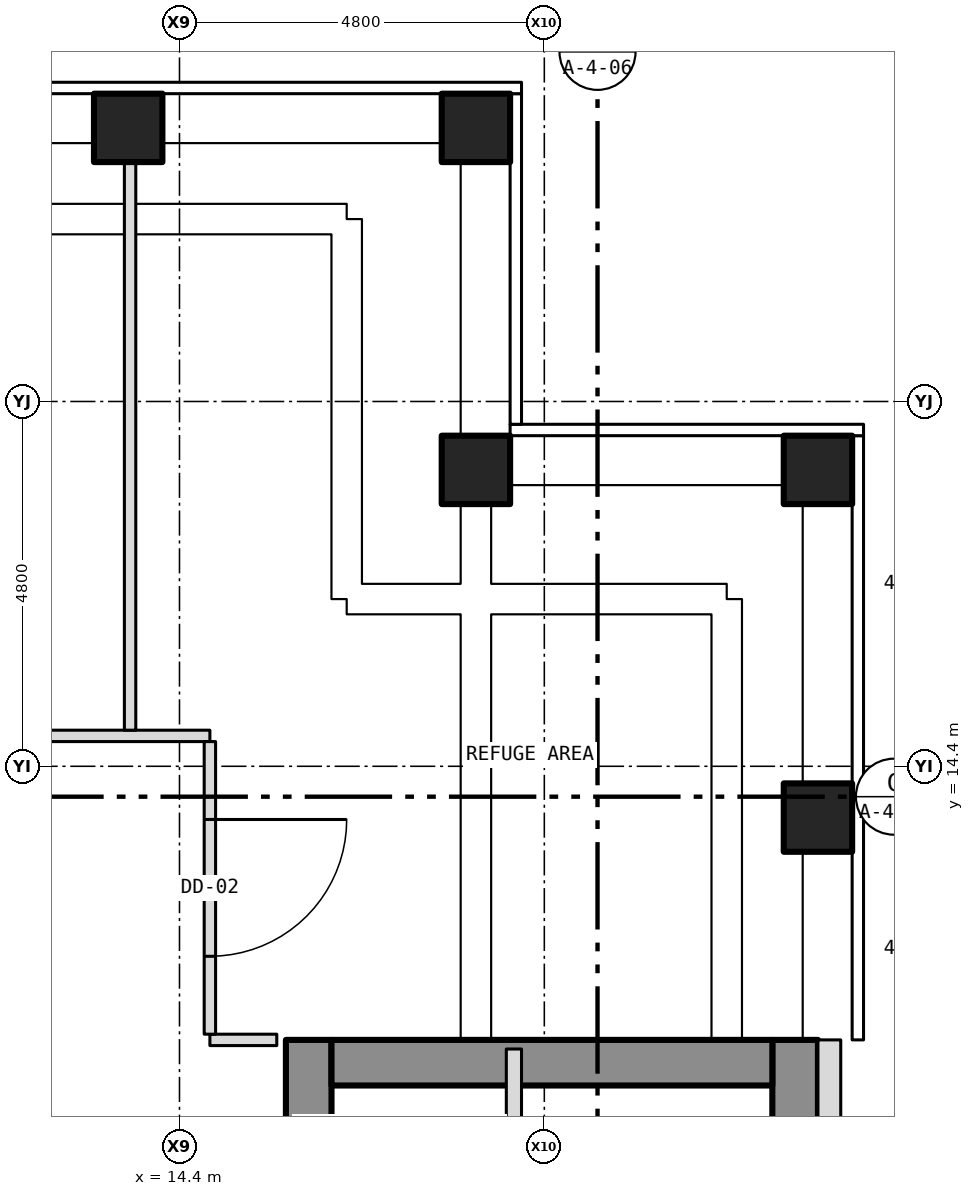
"""IFC4 building model, lengths in metres.
Left out: names, types, materials, properties, quantities, classifications, styles, units other than length and angle.
Written with IfcOpenShell. Run it as: python <this file> out.ifc"""

import sys

from ifc_helpers import new_model, si_unit, direction, frame, frame_2d, origin, origin_2d, place, context, subcontext, project, spatial, rectangle, hollow_rectangle, extrude, element, fill, save


model = new_model("IFC4")
c1 = context("Model", 3, precision=1e-05, world=origin(), true_north=direction((0.0, 1.0)))
c2 = subcontext(c1, "Body", "Model", "MODEL_VIEW")
j1 = project(units=[si_unit("LENGTHUNIT", "METRE"), si_unit("PLANEANGLEUNIT", "RADIAN")], contexts=[c1])
p1 = place(None, origin())
s1 = spatial("IfcSite", under=j1, at=p1, CompositionType="ELEMENT")
p2 = place(p1, origin())
s2 = spatial("IfcBuilding", under=s1, at=p2, CompositionType="ELEMENT")
p3 = place(p2, frame((0.0, 0.0, 138.0)))
s3 = spatial("IfcBuildingStorey", under=s2, at=p3, CompositionType="ELEMENT", Elevation=138.0)
for number, where, z_axis, x_axis in (
    (1, (13.725, 22.8, -0.3), (0.0, 0.0, 1.0), (1.0, 0.0, 0.0)),
    (2, (18.3, 22.8, -0.3), (0.0, 0.0, 1.0), (1.0, 0.0, 0.0)),
    (3, (22.8, 13.725, -0.3), (0.0, 0.0, 1.0), (1.0, 0.0, 0.0)),
    (4, (22.8, 18.3, -0.3), (0.0, 0.0, 1.0), (1.0, 0.0, 0.0)),
    (5, (18.3, 18.3, -0.3), (0.0, 0.0, 1.0), (1.0, 0.0, 0.0)),
):
    element("IfcColumn", number, at=place(p3, frame(where, z_axis=z_axis, x_axis=x_axis)), inside=s3, PredefinedType="COLUMN", context=c2, shape_type="SweptSolid", body=[
        extrude(hollow_rectangle(XDim=0.9, YDim=0.9, WallThickness=0.05, at=origin_2d()), origin(), (0.0, 0.0, 1.0), 4.6),
    ])
p4 = place(p3, frame((16.1, -10.8, 0.0), z_axis=(0.0, 0.0, 1.0), x_axis=(0.0, 1.0, 0.0)))
e6 = element("IfcWall", 6, at=p4, inside=s3, PredefinedType="SHEAR", context=c2, shape_type="SweptSolid", body=[
    extrude(rectangle(XDim=21.6, YDim=0.6, at=frame_2d((10.8, 0.0))), origin(), (0.0, 0.0, 1.0), 3.9),
])
p5 = place(p4, frame((9.4, 0.0, 0.0)))
e7 = element("IfcOpeningElement", 7, at=p5, cuts=e6, PredefinedType="OPENING", context=c2, shape_type="SweptSolid", body=[
    extrude(rectangle(XDim=1.1, YDim=2.1, at=frame_2d((0.55, 1.05))), frame((0.0, 0.312, 0.0), z_axis=(0.0, -1.0, 0.0), x_axis=(1.0, 0.0, 0.0)), (0.0, 0.0, 1.0), 0.624),
])
p6 = place(p4, frame((11.5, 0.0, 0.0)))
e8 = element("IfcOpeningElement", 8, at=p6, cuts=e6, PredefinedType="OPENING", context=c2, shape_type="SweptSolid", body=[
    extrude(rectangle(XDim=1.1, YDim=2.1, at=frame_2d((0.55, 1.05))), frame((0.0, 0.312, 0.0), z_axis=(0.0, -1.0, 0.0), x_axis=(1.0, 0.0, 0.0)), (0.0, 0.0, 1.0), 0.624),
])
p7 = place(p4, frame((5.642, 0.0, 0.0)))
e9 = element("IfcOpeningElement", 9, at=p7, cuts=e6, PredefinedType="OPENING", context=c2, shape_type="SweptSolid", body=[
    extrude(rectangle(XDim=1.1, YDim=2.1, at=frame_2d((0.55, 1.05))), frame((0.0, 0.312, 0.0), z_axis=(0.0, -1.0, 0.0), x_axis=(1.0, 0.0, 0.0)), (0.0, 0.0, 1.0), 0.624),
])
p8 = place(p4, frame((7.5, 0.0, 0.0)))
e10 = element("IfcOpeningElement", 10, at=p8, cuts=e6, PredefinedType="OPENING", context=c2, shape_type="SweptSolid", body=[
    extrude(rectangle(XDim=1.1, YDim=2.1, at=frame_2d((0.55, 1.05))), frame((0.0, 0.312, 0.0), z_axis=(0.0, -1.0, 0.0), x_axis=(1.0, 0.0, 0.0)), (0.0, 0.0, 1.0), 0.624),
])
p9 = place(p3, frame((22.5, -10.8, 0.0), z_axis=(0.0, 0.0, 1.0), x_axis=(0.0, 1.0, 0.0)))
e11 = element("IfcWall", 11, at=p9, inside=s3, PredefinedType="SHEAR", context=c2, shape_type="SweptSolid", body=[
    extrude(rectangle(XDim=21.6, YDim=0.6, at=frame_2d((10.8, 0.0))), origin(), (0.0, 0.0, 1.0), 3.9),
])
p10 = place(p3, frame((16.4, 10.5, 0.0), z_axis=(0.0, 0.0, 1.0), x_axis=(1.0, 0.0, 0.0)))
e12 = element("IfcWall", 12, at=p10, inside=s3, PredefinedType="SHEAR", context=c2, shape_type="SweptSolid", body=[
    extrude(rectangle(XDim=5.8, YDim=0.6, at=frame_2d((2.9, 0.0))), origin(), (0.0, 0.0, 1.0), 3.9),
])
p11 = place(p3, frame((22.95, -10.8, 0.0), z_axis=(0.0, 0.0, 1.0), x_axis=(0.0, 1.0, 0.0)))
e13 = element("IfcWall", 13, at=p11, inside=s3, PredefinedType="SOLIDWALL", context=c2, shape_type="SweptSolid", body=[
    extrude(rectangle(XDim=21.6, YDim=0.3, at=frame_2d((10.8, 0.0))), origin(), (0.0, 0.0, 1.0), 4.5),
])
p12 = place(p11, frame((3.0, 0.0, 2.2)))
e14 = element("IfcOpeningElement", 14, at=p12, cuts=e13, PredefinedType="OPENING", context=c2, shape_type="SweptSolid", body=[
    extrude(rectangle(XDim=1.2, YDim=0.6, at=frame_2d((0.6, 0.3))), frame((0.0, 0.162, 0.0), z_axis=(0.0, -1.0, 0.0), x_axis=(1.0, 0.0, 0.0)), (0.0, 0.0, 1.0), 0.324),
])
p13 = place(p11, frame((7.8, 0.0, 2.2)))
e15 = element("IfcOpeningElement", 15, at=p13, cuts=e13, PredefinedType="OPENING", context=c2, shape_type="SweptSolid", body=[
    extrude(rectangle(XDim=1.2, YDim=0.6, at=frame_2d((0.6, 0.3))), frame((0.0, 0.162, 0.0), z_axis=(0.0, -1.0, 0.0), x_axis=(1.0, 0.0, 0.0)), (0.0, 0.0, 1.0), 0.324),
])
p14 = place(p11, frame((12.6, 0.0, 2.2)))
e16 = element("IfcOpeningElement", 16, at=p14, cuts=e13, PredefinedType="OPENING", context=c2, shape_type="SweptSolid", body=[
    extrude(rectangle(XDim=1.2, YDim=0.6, at=frame_2d((0.6, 0.3))), frame((0.0, 0.162, 0.0), z_axis=(0.0, -1.0, 0.0), x_axis=(1.0, 0.0, 0.0)), (0.0, 0.0, 1.0), 0.324),
])
p15 = place(p11, frame((17.4, 0.0, 2.2)))
e17 = element("IfcOpeningElement", 17, at=p15, cuts=e13, PredefinedType="OPENING", context=c2, shape_type="SweptSolid", body=[
    extrude(rectangle(XDim=1.2, YDim=0.6, at=frame_2d((0.6, 0.3))), frame((0.0, 0.162, 0.0), z_axis=(0.0, -1.0, 0.0), x_axis=(1.0, 0.0, 0.0)), (0.0, 0.0, 1.0), 0.324),
])
p16 = place(p3, frame((14.8, 10.8, 0.0), z_axis=(0.0, 0.0, 1.0), x_axis=(1.0, 0.0, 0.0)))
e18 = element("IfcWall", 18, at=p16, inside=s3, PredefinedType="PARTITIONING", context=c2, shape_type="SweptSolid", body=[
    extrude(rectangle(XDim=0.88, YDim=0.15, at=frame_2d((0.44, 0.0))), origin(), (0.0, 0.0, 1.0), 4.3),
])
p17 = place(p3, frame((-14.8, 14.8, 0.0), z_axis=(0.0, 0.0, 1.0), x_axis=(1.0, 0.0, 0.0)))
e19 = element("IfcWall", 19, at=p17, inside=s3, PredefinedType="PARTITIONING", context=c2, shape_type="SweptSolid", body=[
    extrude(rectangle(XDim=29.6, YDim=0.15, at=frame_2d((14.8, 0.0))), origin(), (0.0, 0.0, 1.0), 4.3),
])
p18 = place(p17, frame((7.488, 0.0, 0.0)))
e20 = element("IfcOpeningElement", 20, at=p18, cuts=e19, PredefinedType="OPENING", context=c2, shape_type="SweptSolid", body=[
    extrude(rectangle(XDim=0.9, YDim=2.1, at=frame_2d((0.45, 1.05))), frame((0.0, 0.087, 0.0), z_axis=(0.0, -1.0, 0.0), x_axis=(1.0, 0.0, 0.0)), (0.0, 0.0, 1.0), 0.174),
])
p19 = place(p17, frame((21.213, 0.0, 0.0)))
e21 = element("IfcOpeningElement", 21, at=p19, cuts=e19, PredefinedType="OPENING", context=c2, shape_type="SweptSolid", body=[
    extrude(rectangle(XDim=0.9, YDim=2.1, at=frame_2d((0.45, 1.05))), frame((0.0, 0.087, 0.0), z_axis=(0.0, -1.0, 0.0), x_axis=(1.0, 0.0, 0.0)), (0.0, 0.0, 1.0), 0.174),
])
p20 = place(p3, frame((13.75, 14.875, 0.0), z_axis=(0.0, 0.0, 1.0), x_axis=(0.0, 1.0, 0.0)))
e22 = element("IfcWall", 22, at=p20, inside=s3, PredefinedType="PARTITIONING", context=c2, shape_type="SweptSolid", body=[
    extrude(rectangle(XDim=7.805, YDim=0.15, at=frame_2d((3.902, 0.0))), origin(), (0.0, 0.0, 1.0), 4.3),
])
p21 = place(p3, frame((14.8, 10.875, 0.0), z_axis=(0.0, 0.0, 1.0), x_axis=(0.0, 1.0, 0.0)))
e23 = element("IfcWall", 23, at=p21, inside=s3, PredefinedType="PARTITIONING", context=c2, shape_type="SweptSolid", body=[
    extrude(rectangle(XDim=3.85, YDim=0.15, at=frame_2d((1.925, 0.0))), origin(), (0.0, 0.0, 1.0), 4.3),
])
p22 = place(p21, frame((1.025, 0.0, 0.0)))
e24 = element("IfcOpeningElement", 24, at=p22, cuts=e23, PredefinedType="OPENING", context=c2, shape_type="SweptSolid", body=[
    extrude(rectangle(XDim=1.8, YDim=2.1, at=frame_2d((0.9, 1.05))), frame((0.0, 0.087, 0.0), z_axis=(0.0, -1.0, 0.0), x_axis=(1.0, 0.0, 0.0)), (0.0, 0.0, 1.0), 0.174),
])
p23 = place(p3, frame((18.8, -1.8, 0.0), z_axis=(0.0, 0.0, 1.0), x_axis=(0.0, 1.0, 0.0)))
e25 = element("IfcWall", 25, at=p23, inside=s3, PredefinedType="PARTITIONING", context=c2, shape_type="SweptSolid", body=[
    extrude(rectangle(XDim=12.48, YDim=0.2, at=frame_2d((6.24, 0.0))), origin(), (0.0, 0.0, 1.0), 3.9),
])
p24 = place(p22, origin())
e26 = element("IfcDoor", 26, at=p24, inside=s3, OperationType="DOUBLE_DOOR_SINGLE_SWING", PredefinedType="DOOR", context=c2, shape_type="SweptSolid", body=[
    extrude(rectangle(XDim=1.8, YDim=2.1, at=frame_2d((0.9, 1.05))), frame((0.0, 0.025, 0.0), z_axis=(0.0, -1.0, 0.0), x_axis=(1.0, 0.0, 0.0)), (0.0, 0.0, 1.0), 0.05),
])
fill(e24, e26)
save(model, sys.argv[1])
